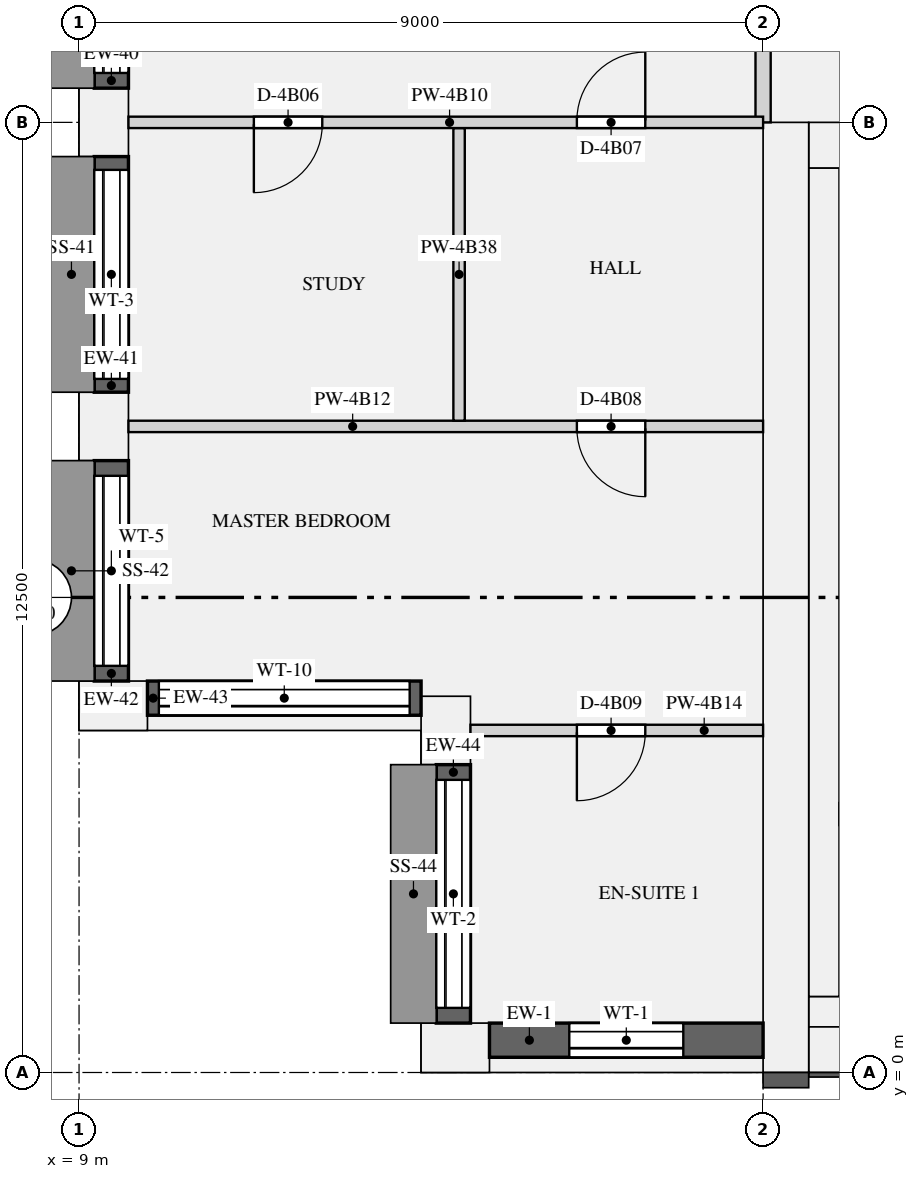
"""IFC4 building model, lengths in metres.
Left out: names, types, materials, properties, quantities, classifications, styles, units other than length and angle.
Written with IfcOpenShell. Run it as: python <this file> out.ifc"""

import sys

from ifc_helpers import new_model, si_unit, direction, frame, frame_2d, origin, origin_2d, place, context, subcontext, project, spatial, rectangle, extrude, element, fill, save


model = new_model("IFC4")
c1 = context("Model", 3, precision=1e-05, world=origin(), true_north=direction((0.0, 1.0)))
c2 = subcontext(c1, "Body", "Model", "MODEL_VIEW")
j1 = project(units=[si_unit("LENGTHUNIT", "METRE"), si_unit("PLANEANGLEUNIT", "RADIAN")], contexts=[c1])
p1 = place(None, origin())
s1 = spatial("IfcSite", under=j1, at=p1, CompositionType="ELEMENT")
p2 = place(p1, origin())
s2 = spatial("IfcBuilding", under=s1, at=p2, CompositionType="ELEMENT")
p3 = place(p2, frame((0.0, 0.0, 207.45)))
s3 = spatial("IfcBuildingStorey", under=s2, at=p3, CompositionType="ELEMENT", Elevation=207.45)
for number, where, z_axis, x_axis in (
    (1, (13.95, 0.325, 0.0), (0.0, 0.0, 1.0), (1.0, 0.0, 0.0)),
    (2, (9.325, 12.5, 0.0), (0.0, 0.0, 1.0), (0.0, -1.0, 0.0)),
    (3, (9.325, 8.5, 0.0), (0.0, 0.0, 1.0), (0.0, -1.0, 0.0)),
    (4, (9.45, 4.825, 0.0), (0.0, 0.0, 1.0), (1.0, 0.0, 0.0)),
    (5, (13.825, 4.5, 0.0), (0.0, 0.0, 1.0), (0.0, -1.0, 0.0)),
):
    element("IfcColumn", number, at=place(p3, frame(where, z_axis=z_axis, x_axis=x_axis)), inside=s3, PredefinedType="USERDEFINED", context=c2, shape_type="SweptSolid", body=[
        extrude(rectangle(XDim=0.9, YDim=0.65, at=origin_2d()), origin(), (0.0, 0.0, 1.0), 3.15),
    ])
p4 = place(p3, frame((18.3, 0.0, 0.0), z_axis=(0.0, 0.0, 1.0), x_axis=(0.0, 1.0, 0.0)))
e6 = element("IfcWall", 6, at=p4, inside=s3, PredefinedType="SHEAR", context=c2, shape_type="SweptSolid", body=[
    extrude(rectangle(XDim=12.5, YDim=0.6, at=frame_2d((6.25, 0.0))), origin(), (0.0, 0.0, 1.0), 3.15),
])
p5 = place(p3, frame((18.6, 0.3, 0.0), z_axis=(0.0, 0.0, 1.0), x_axis=(1.0, 0.0, 0.0)))
e7 = element("IfcWall", 7, at=p5, inside=s3, PredefinedType="SHEAR", context=c2, shape_type="SweptSolid", body=[
    extrude(rectangle(XDim=34.8, YDim=0.6, at=frame_2d((17.4, 0.0))), origin(), (0.0, 0.0, 1.0), 3.15),
])
p6 = place(p3, frame((18.6, 12.2, 0.0), z_axis=(0.0, 0.0, 1.0), x_axis=(1.0, 0.0, 0.0)))
e8 = element("IfcWall", 8, at=p6, inside=s3, PredefinedType="SHEAR", context=c2, shape_type="SweptSolid", body=[
    extrude(rectangle(XDim=34.8, YDim=0.6, at=frame_2d((17.4, 0.0))), origin(), (0.0, 0.0, 1.0), 3.15),
])
p7 = place(p6, frame((24.575, 0.0, 0.0)))
e9 = element("IfcOpeningElement", 9, at=p7, cuts=e8, PredefinedType="OPENING", context=c2, shape_type="SweptSolid", body=[
    extrude(rectangle(XDim=1.1, YDim=2.1, at=frame_2d((0.55, 1.05))), frame((0.0, 0.31, 0.0), z_axis=(0.0, -1.0, 0.0), x_axis=(1.0, 0.0, 0.0)), (0.0, 0.0, 1.0), 0.62),
])
p8 = place(p6, frame((26.825, 0.0, 0.0)))
e10 = element("IfcOpeningElement", 10, at=p8, cuts=e8, PredefinedType="OPENING", context=c2, shape_type="SweptSolid", body=[
    extrude(rectangle(XDim=1.1, YDim=2.1, at=frame_2d((0.55, 1.05))), frame((0.0, 0.31, 0.0), z_axis=(0.0, -1.0, 0.0), x_axis=(1.0, 0.0, 0.0)), (0.0, 0.0, 1.0), 0.62),
])
p9 = place(p6, frame((29.075, 0.0, 0.0)))
e11 = element("IfcOpeningElement", 11, at=p9, cuts=e8, PredefinedType="OPENING", context=c2, shape_type="SweptSolid", body=[
    extrude(rectangle(XDim=1.1, YDim=2.1, at=frame_2d((0.55, 1.05))), frame((0.0, 0.31, 0.0), z_axis=(0.0, -1.0, 0.0), x_axis=(1.0, 0.0, 0.0)), (0.0, 0.0, 1.0), 0.62),
])
p10 = place(p6, frame((4.95, 0.0, 0.0)))
e12 = element("IfcOpeningElement", 12, at=p10, cuts=e8, PredefinedType="OPENING", context=c2, shape_type="SweptSolid", body=[
    extrude(rectangle(XDim=0.9, YDim=2.1, at=frame_2d((0.45, 1.05))), frame((0.0, 0.31, 0.0), z_axis=(0.0, -1.0, 0.0), x_axis=(1.0, 0.0, 0.0)), (0.0, 0.0, 1.0), 0.62),
])
p11 = place(p6, frame((13.95, 0.0, 0.0)))
e13 = element("IfcOpeningElement", 13, at=p11, cuts=e8, PredefinedType="OPENING", context=c2, shape_type="SweptSolid", body=[
    extrude(rectangle(XDim=0.9, YDim=2.1, at=frame_2d((0.45, 1.05))), frame((0.0, 0.31, 0.0), z_axis=(0.0, -1.0, 0.0), x_axis=(1.0, 0.0, 0.0)), (0.0, 0.0, 1.0), 0.62),
])
p12 = place(p6, frame((18.45, 0.0, 0.0)))
e14 = element("IfcOpeningElement", 14, at=p12, cuts=e8, PredefinedType="OPENING", context=c2, shape_type="SweptSolid", body=[
    extrude(rectangle(XDim=0.9, YDim=2.1, at=frame_2d((0.45, 1.05))), frame((0.0, 0.31, 0.0), z_axis=(0.0, -1.0, 0.0), x_axis=(1.0, 0.0, 0.0)), (0.0, 0.0, 1.0), 0.62),
])
p13 = place(p6, frame((1.55, 0.0, 0.0)))
e15 = element("IfcOpeningElement", 15, at=p13, cuts=e8, PredefinedType="OPENING", context=c2, shape_type="SweptSolid", body=[
    extrude(rectangle(XDim=1.2, YDim=2.1, at=frame_2d((0.6, 1.05))), frame((0.0, 0.31, 0.0), z_axis=(0.0, -1.0, 0.0), x_axis=(1.0, 0.0, 0.0)), (0.0, 0.0, 1.0), 0.62),
])
p14 = place(p6, frame((32.05, 0.0, 0.0)))
e16 = element("IfcOpeningElement", 16, at=p14, cuts=e8, PredefinedType="OPENING", context=c2, shape_type="SweptSolid", body=[
    extrude(rectangle(XDim=1.2, YDim=2.1, at=frame_2d((0.6, 1.05))), frame((0.0, 0.31, 0.0), z_axis=(0.0, -1.0, 0.0), x_axis=(1.0, 0.0, 0.0)), (0.0, 0.0, 1.0), 0.62),
])
p15 = place(p3, frame((18.8, 1.0, 0.0), z_axis=(0.0, 0.0, 1.0), x_axis=(0.0, 1.0, 0.0)))
e17 = element("IfcWall", 17, at=p15, inside=s3, PredefinedType="SHEAR", context=c2, shape_type="SweptSolid", body=[
    extrude(rectangle(XDim=10.9, YDim=0.4, at=frame_2d((5.45, 0.0))), origin(), (0.0, 0.0, 1.0), 3.15),
])
p16 = place(p3, frame((18.6, 0.8, 0.0), z_axis=(0.0, 0.0, 1.0), x_axis=(1.0, 0.0, 0.0)))
e18 = element("IfcWall", 18, at=p16, inside=s3, PredefinedType="SHEAR", context=c2, shape_type="SweptSolid", body=[
    extrude(rectangle(XDim=34.8, YDim=0.4, at=frame_2d((17.4, 0.0))), origin(), (0.0, 0.0, 1.0), 3.15),
])
p17 = place(p3, frame((19.0, 3.4, 0.0), z_axis=(0.0, 0.0, 1.0), x_axis=(1.0, 0.0, 0.0)))
e19 = element("IfcWall", 19, at=p17, inside=s3, PredefinedType="SHEAR", context=c2, shape_type="SweptSolid", body=[
    extrude(rectangle(XDim=2.55, YDim=0.3, at=frame_2d((1.275, 0.0))), origin(), (0.0, 0.0, 1.0), 3.15),
])
p18 = place(p17, frame((0.675, 0.0, 0.0)))
e20 = element("IfcOpeningElement", 20, at=p18, cuts=e19, PredefinedType="OPENING", context=c2, shape_type="SweptSolid", body=[
    extrude(rectangle(XDim=1.2, YDim=2.1, at=frame_2d((0.6, 1.05))), frame((0.0, 0.16, 0.0), z_axis=(0.0, -1.0, 0.0), x_axis=(1.0, 0.0, 0.0)), (0.0, 0.0, 1.0), 0.32),
])
p19 = place(p3, frame((14.4, 0.425, 0.9), z_axis=(0.0, 0.0, 1.0), x_axis=(1.0, 0.0, 0.0)))
e21 = element("IfcWall", 21, at=p19, inside=s3, PredefinedType="SOLIDWALL", context=c2, shape_type="SweptSolid", body=[
    extrude(rectangle(XDim=3.6, YDim=0.45, at=frame_2d((1.8, 0.0))), origin(), (0.0, 0.0, 1.0), 1.93),
])
p20 = place(p19, frame((1.05, 0.0, 0.15)))
e22 = element("IfcOpeningElement", 22, at=p20, cuts=e21, PredefinedType="OPENING", context=c2, shape_type="SweptSolid", body=[
    extrude(rectangle(XDim=1.5, YDim=1.5, at=frame_2d((0.75, 0.75))), frame((0.0, 0.235, 0.0), z_axis=(0.0, -1.0, 0.0), x_axis=(1.0, 0.0, 0.0)), (0.0, 0.0, 1.0), 0.47),
])
p21 = place(p3, frame((9.425, 15.6, 0.9), z_axis=(0.0, 0.0, 1.0), x_axis=(0.0, -1.0, 0.0)))
e23 = element("IfcWall", 23, at=p21, inside=s3, PredefinedType="SOLIDWALL", context=c2, shape_type="SweptSolid", body=[
    extrude(rectangle(XDim=2.65, YDim=0.45, at=frame_2d((1.325, 0.0))), origin(), (0.0, 0.0, 1.0), 1.93),
])
p22 = place(p21, frame((0.2, 0.0, 0.15)))
e24 = element("IfcOpeningElement", 24, at=p22, cuts=e23, PredefinedType="OPENING", context=c2, shape_type="SweptSolid", body=[
    extrude(rectangle(XDim=2.25, YDim=1.5, at=frame_2d((1.125, 0.75))), frame((0.0, 0.235, 0.0), z_axis=(0.0, -1.0, 0.0), x_axis=(1.0, 0.0, 0.0)), (0.0, 0.0, 1.0), 0.47),
])
p23 = place(p3, frame((9.425, 12.05, 0.9), z_axis=(0.0, 0.0, 1.0), x_axis=(0.0, -1.0, 0.0)))
e25 = element("IfcWall", 25, at=p23, inside=s3, PredefinedType="SOLIDWALL", context=c2, shape_type="SweptSolid", body=[
    extrude(rectangle(XDim=3.1, YDim=0.45, at=frame_2d((1.55, 0.0))), origin(), (0.0, 0.0, 1.0), 1.93),
])
p24 = place(p23, frame((0.175, 0.0, 0.15)))
e26 = element("IfcOpeningElement", 26, at=p24, cuts=e25, PredefinedType="OPENING", context=c2, shape_type="SweptSolid", body=[
    extrude(rectangle(XDim=2.75, YDim=1.5, at=frame_2d((1.375, 0.75))), frame((0.0, 0.235, 0.0), z_axis=(0.0, -1.0, 0.0), x_axis=(1.0, 0.0, 0.0)), (0.0, 0.0, 1.0), 0.47),
])
p25 = place(p3, frame((9.425, 8.05, 0.9), z_axis=(0.0, 0.0, 1.0), x_axis=(0.0, -1.0, 0.0)))
e27 = element("IfcWall", 27, at=p25, inside=s3, PredefinedType="SOLIDWALL", context=c2, shape_type="SweptSolid", body=[
    extrude(rectangle(XDim=2.9, YDim=0.45, at=frame_2d((1.45, 0.0))), origin(), (0.0, 0.0, 1.0), 1.93),
])
p26 = place(p25, frame((0.2, 0.0, 0.15)))
e28 = element("IfcOpeningElement", 28, at=p26, cuts=e27, PredefinedType="OPENING", context=c2, shape_type="SweptSolid", body=[
    extrude(rectangle(XDim=2.5, YDim=1.5, at=frame_2d((1.25, 0.75))), frame((0.0, 0.235, 0.0), z_axis=(0.0, -1.0, 0.0), x_axis=(1.0, 0.0, 0.0)), (0.0, 0.0, 1.0), 0.47),
])
p27 = place(p3, frame((9.9, 4.925, 0.9), z_axis=(0.0, 0.0, 1.0), x_axis=(1.0, 0.0, 0.0)))
e29 = element("IfcWall", 29, at=p27, inside=s3, PredefinedType="SOLIDWALL", context=c2, shape_type="SweptSolid", body=[
    extrude(rectangle(XDim=3.6, YDim=0.45, at=frame_2d((1.8, 0.0))), origin(), (0.0, 0.0, 1.0), 1.93),
])
p28 = place(p27, frame((0.15, 0.0, 0.15)))
e30 = element("IfcOpeningElement", 30, at=p28, cuts=e29, PredefinedType="OPENING", context=c2, shape_type="SweptSolid", body=[
    extrude(rectangle(XDim=3.3, YDim=1.5, at=frame_2d((1.65, 0.75))), frame((0.0, 0.235, 0.0), z_axis=(0.0, -1.0, 0.0), x_axis=(1.0, 0.0, 0.0)), (0.0, 0.0, 1.0), 0.47),
])
p29 = place(p3, frame((13.925, 4.05, 0.9), z_axis=(0.0, 0.0, 1.0), x_axis=(0.0, -1.0, 0.0)))
e31 = element("IfcWall", 31, at=p29, inside=s3, PredefinedType="SOLIDWALL", context=c2, shape_type="SweptSolid", body=[
    extrude(rectangle(XDim=3.4, YDim=0.45, at=frame_2d((1.7, 0.0))), origin(), (0.0, 0.0, 1.0), 1.93),
])
p30 = place(p29, frame((0.2, 0.0, 0.15)))
e32 = element("IfcOpeningElement", 32, at=p30, cuts=e31, PredefinedType="OPENING", context=c2, shape_type="SweptSolid", body=[
    extrude(rectangle(XDim=3.0, YDim=1.5, at=frame_2d((1.5, 0.75))), frame((0.0, 0.235, 0.0), z_axis=(0.0, -1.0, 0.0), x_axis=(1.0, 0.0, 0.0)), (0.0, 0.0, 1.0), 0.47),
])
p31 = place(p3, frame((18.0, 12.5, 0.0), z_axis=(0.0, 0.0, 1.0), x_axis=(0.0, 1.0, 0.0)))
e33 = element("IfcWall", 33, at=p31, inside=s3, PredefinedType="PARTITIONING", context=c2, shape_type="SweptSolid", body=[
    extrude(rectangle(XDim=3.4, YDim=0.2, at=frame_2d((1.7, 0.0))), origin(), (0.0, 0.0, 1.0), 2.83),
])
p32 = place(p3, frame((9.65, 12.5, 0.0), z_axis=(0.0, 0.0, 1.0), x_axis=(1.0, 0.0, 0.0)))
e34 = element("IfcWall", 34, at=p32, inside=s3, PredefinedType="PARTITIONING", context=c2, shape_type="SweptSolid", body=[
    extrude(rectangle(XDim=8.35, YDim=0.15, at=frame_2d((4.175, 0.0))), origin(), (0.0, 0.0, 1.0), 2.83),
])
p33 = place(p32, frame((1.65, 0.0, 0.0)))
e35 = element("IfcOpeningElement", 35, at=p33, cuts=e34, PredefinedType="OPENING", context=c2, shape_type="SweptSolid", body=[
    extrude(rectangle(XDim=0.9, YDim=2.1, at=frame_2d((0.45, 1.05))), frame((0.0, 0.085, 0.0), z_axis=(0.0, -1.0, 0.0), x_axis=(1.0, 0.0, 0.0)), (0.0, 0.0, 1.0), 0.17),
])
p34 = place(p32, frame((5.9, 0.0, 0.0)))
e36 = element("IfcOpeningElement", 36, at=p34, cuts=e34, PredefinedType="OPENING", context=c2, shape_type="SweptSolid", body=[
    extrude(rectangle(XDim=0.9, YDim=2.1, at=frame_2d((0.45, 1.05))), frame((0.0, 0.085, 0.0), z_axis=(0.0, -1.0, 0.0), x_axis=(1.0, 0.0, 0.0)), (0.0, 0.0, 1.0), 0.17),
])
p35 = place(p3, frame((9.65, 8.5, 0.0), z_axis=(0.0, 0.0, 1.0), x_axis=(1.0, 0.0, 0.0)))
e37 = element("IfcWall", 37, at=p35, inside=s3, PredefinedType="PARTITIONING", context=c2, shape_type="SweptSolid", body=[
    extrude(rectangle(XDim=8.35, YDim=0.15, at=frame_2d((4.175, 0.0))), origin(), (0.0, 0.0, 1.0), 2.83),
])
p36 = place(p35, frame((5.9, 0.0, 0.0)))
e38 = element("IfcOpeningElement", 38, at=p36, cuts=e37, PredefinedType="OPENING", context=c2, shape_type="SweptSolid", body=[
    extrude(rectangle(XDim=0.9, YDim=2.1, at=frame_2d((0.45, 1.05))), frame((0.0, 0.085, 0.0), z_axis=(0.0, -1.0, 0.0), x_axis=(1.0, 0.0, 0.0)), (0.0, 0.0, 1.0), 0.17),
])
p37 = place(p3, frame((14.15, 4.5, 0.0), z_axis=(0.0, 0.0, 1.0), x_axis=(1.0, 0.0, 0.0)))
e39 = element("IfcWall", 39, at=p37, inside=s3, PredefinedType="PARTITIONING", context=c2, shape_type="SweptSolid", body=[
    extrude(rectangle(XDim=3.85, YDim=0.15, at=frame_2d((1.925, 0.0))), origin(), (0.0, 0.0, 1.0), 2.83),
])
p38 = place(p37, frame((1.4, 0.0, 0.0)))
e40 = element("IfcOpeningElement", 40, at=p38, cuts=e39, PredefinedType="OPENING", context=c2, shape_type="SweptSolid", body=[
    extrude(rectangle(XDim=0.9, YDim=2.1, at=frame_2d((0.45, 1.05))), frame((0.0, 0.085, 0.0), z_axis=(0.0, -1.0, 0.0), x_axis=(1.0, 0.0, 0.0)), (0.0, 0.0, 1.0), 0.17),
])
p39 = place(p3, frame((14.0, 8.575, 0.0), z_axis=(0.0, 0.0, 1.0), x_axis=(0.0, 1.0, 0.0)))
e41 = element("IfcWall", 41, at=p39, inside=s3, PredefinedType="PARTITIONING", context=c2, shape_type="SweptSolid", body=[
    extrude(rectangle(XDim=3.85, YDim=0.15, at=frame_2d((1.925, 0.0))), origin(), (0.0, 0.0, 1.0), 2.83),
])
p40 = place(p20, origin())
e42 = element("IfcWindow", 42, at=p40, inside=s3, PartitioningType="SINGLE_PANEL", PredefinedType="WINDOW", context=c2, shape_type="SweptSolid", body=[
    extrude(rectangle(XDim=1.5, YDim=1.5, at=frame_2d((0.75, 0.75))), frame((0.0, -0.065, 0.0), z_axis=(0.0, -1.0, 0.0), x_axis=(1.0, 0.0, 0.0)), (0.0, 0.0, 1.0), 0.06),
])
fill(e22, e42)
p41 = place(p22, origin())
e43 = element("IfcWindow", 43, at=p41, inside=s3, PartitioningType="SINGLE_PANEL", PredefinedType="WINDOW", context=c2, shape_type="SweptSolid", body=[
    extrude(rectangle(XDim=2.25, YDim=1.5, at=frame_2d((1.125, 0.75))), frame((0.0, -0.065, 0.0), z_axis=(0.0, -1.0, 0.0), x_axis=(1.0, 0.0, 0.0)), (0.0, 0.0, 1.0), 0.06),
])
fill(e24, e43)
p42 = place(p24, origin())
e44 = element("IfcWindow", 44, at=p42, inside=s3, PartitioningType="SINGLE_PANEL", PredefinedType="WINDOW", context=c2, shape_type="SweptSolid", body=[
    extrude(rectangle(XDim=2.75, YDim=1.5, at=frame_2d((1.375, 0.75))), frame((0.0, -0.065, 0.0), z_axis=(0.0, -1.0, 0.0), x_axis=(1.0, 0.0, 0.0)), (0.0, 0.0, 1.0), 0.06),
])
fill(e26, e44)
p43 = place(p26, origin())
e45 = element("IfcWindow", 45, at=p43, inside=s3, PartitioningType="SINGLE_PANEL", PredefinedType="WINDOW", context=c2, shape_type="SweptSolid", body=[
    extrude(rectangle(XDim=2.5, YDim=1.5, at=frame_2d((1.25, 0.75))), frame((0.0, -0.065, 0.0), z_axis=(0.0, -1.0, 0.0), x_axis=(1.0, 0.0, 0.0)), (0.0, 0.0, 1.0), 0.06),
])
fill(e28, e45)
p44 = place(p28, origin())
e46 = element("IfcWindow", 46, at=p44, inside=s3, PartitioningType="SINGLE_PANEL", PredefinedType="WINDOW", context=c2, shape_type="SweptSolid", body=[
    extrude(rectangle(XDim=3.3, YDim=1.5, at=frame_2d((1.65, 0.75))), frame((0.0, -0.065, 0.0), z_axis=(0.0, -1.0, 0.0), x_axis=(1.0, 0.0, 0.0)), (0.0, 0.0, 1.0), 0.06),
])
fill(e30, e46)
p45 = place(p30, origin())
e47 = element("IfcWindow", 47, at=p45, inside=s3, PartitioningType="SINGLE_PANEL", PredefinedType="WINDOW", context=c2, shape_type="SweptSolid", body=[
    extrude(rectangle(XDim=3.0, YDim=1.5, at=frame_2d((1.5, 0.75))), frame((0.0, -0.065, 0.0), z_axis=(0.0, -1.0, 0.0), x_axis=(1.0, 0.0, 0.0)), (0.0, 0.0, 1.0), 0.06),
])
fill(e32, e47)
p46 = place(p33, frame((0.9, 0.0, 0.0), z_axis=(0.0, 0.0, 1.0), x_axis=(-1.0, 0.0, 0.0)))
e48 = element("IfcDoor", 48, at=p46, inside=s3, OperationType="SINGLE_SWING_RIGHT", PredefinedType="DOOR", context=c2, shape_type="SweptSolid", body=[
    extrude(rectangle(XDim=0.9, YDim=2.1, at=frame_2d((0.45, 1.05))), frame((0.0, 0.025, 0.0), z_axis=(0.0, -1.0, 0.0), x_axis=(1.0, 0.0, 0.0)), (0.0, 0.0, 1.0), 0.05),
])
fill(e35, e48)
p47 = place(p34, origin())
e49 = element("IfcDoor", 49, at=p47, inside=s3, OperationType="SINGLE_SWING_RIGHT", PredefinedType="DOOR", context=c2, shape_type="SweptSolid", body=[
    extrude(rectangle(XDim=0.9, YDim=2.1, at=frame_2d((0.45, 1.05))), frame((0.0, 0.025, 0.0), z_axis=(0.0, -1.0, 0.0), x_axis=(1.0, 0.0, 0.0)), (0.0, 0.0, 1.0), 0.05),
])
fill(e36, e49)
p48 = place(p36, frame((0.9, 0.0, 0.0), z_axis=(0.0, 0.0, 1.0), x_axis=(-1.0, 0.0, 0.0)))
e50 = element("IfcDoor", 50, at=p48, inside=s3, OperationType="SINGLE_SWING_LEFT", PredefinedType="DOOR", context=c2, shape_type="SweptSolid", body=[
    extrude(rectangle(XDim=0.9, YDim=2.1, at=frame_2d((0.45, 1.05))), frame((0.0, 0.025, 0.0), z_axis=(0.0, -1.0, 0.0), x_axis=(1.0, 0.0, 0.0)), (0.0, 0.0, 1.0), 0.05),
])
fill(e38, e50)
p49 = place(p38, frame((0.9, 0.0, 0.0), z_axis=(0.0, 0.0, 1.0), x_axis=(-1.0, 0.0, 0.0)))
e51 = element("IfcDoor", 51, at=p49, inside=s3, OperationType="SINGLE_SWING_RIGHT", PredefinedType="DOOR", context=c2, shape_type="SweptSolid", body=[
    extrude(rectangle(XDim=0.9, YDim=2.1, at=frame_2d((0.45, 1.05))), frame((0.0, 0.025, 0.0), z_axis=(0.0, -1.0, 0.0), x_axis=(1.0, 0.0, 0.0)), (0.0, 0.0, 1.0), 0.05),
])
fill(e40, e51)
save(model, sys.argv[1])
